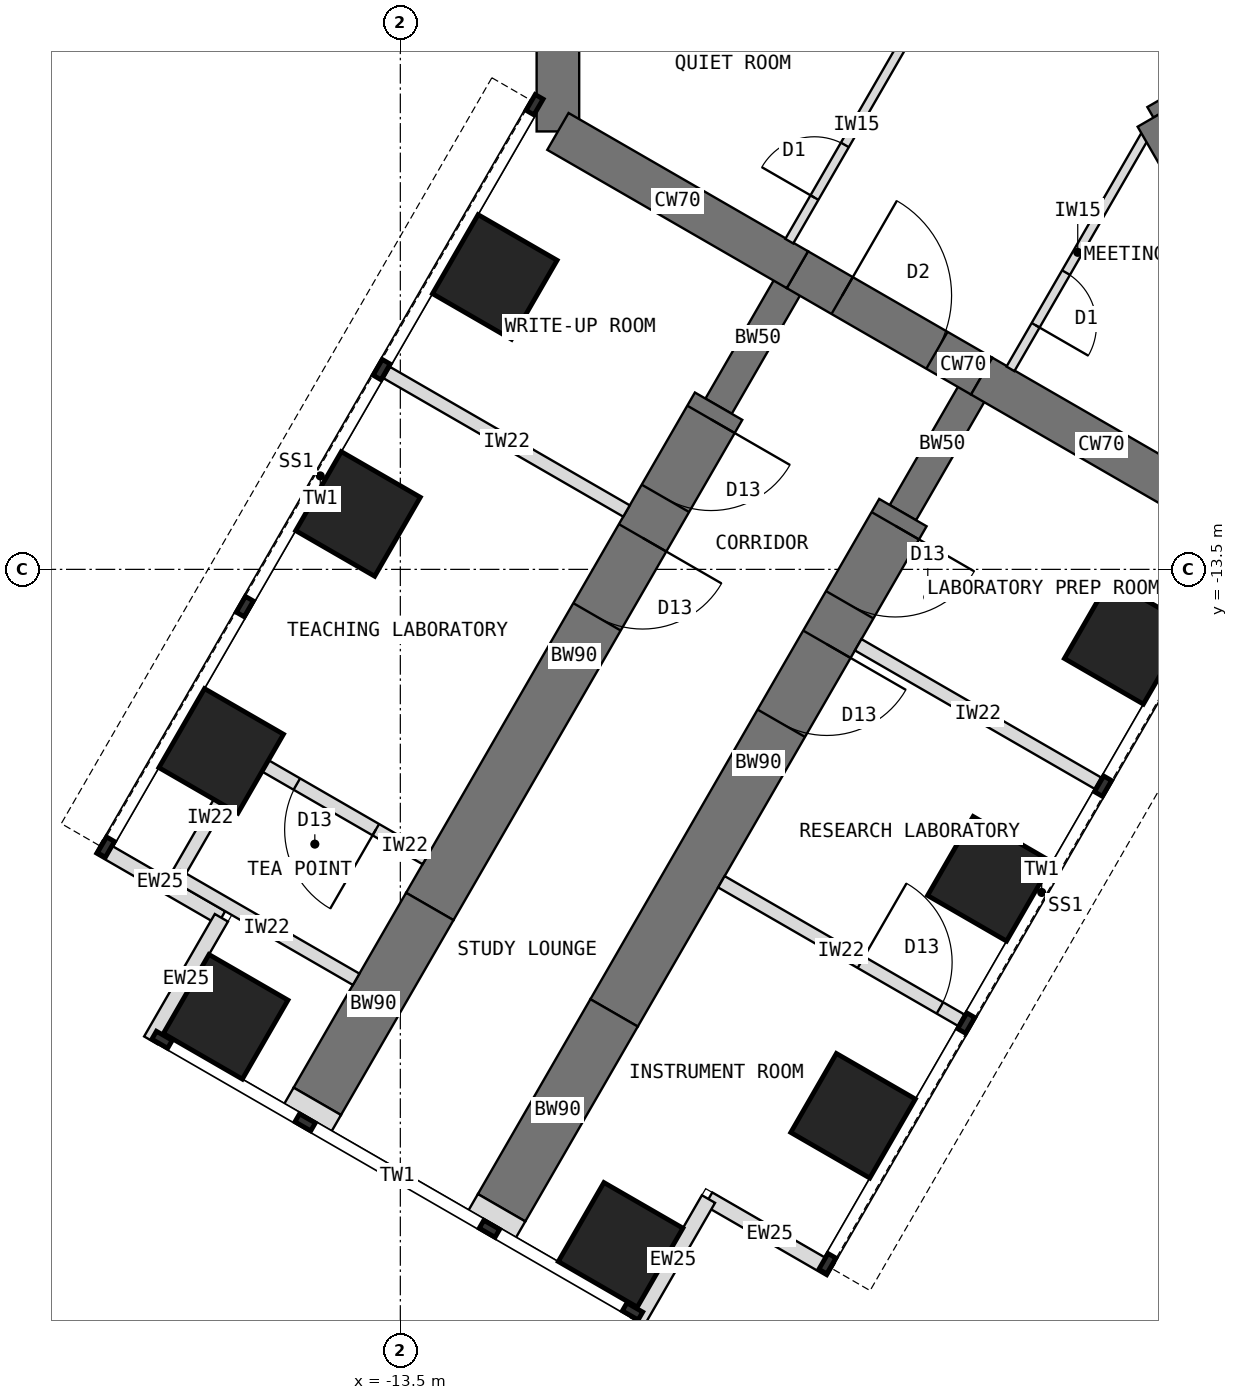
"""IFC4 building model, lengths in metres.
Left out: names, types, materials, properties, quantities, classifications, styles, units other than length and angle.
Written with IfcOpenShell. Run it as: python <this file> out.ifc"""

import sys

from ifc_helpers import new_model, si_unit, direction, frame, frame_2d, origin, origin_2d, place, context, subcontext, project, spatial, rectangle, extrude, element, fill, save


model = new_model("IFC4")
c1 = context("Model", 3, precision=1e-05, world=origin(), true_north=direction((0.0, 1.0)))
c2 = subcontext(c1, "Body", "Model", "MODEL_VIEW")
j1 = project(units=[si_unit("LENGTHUNIT", "METRE"), si_unit("PLANEANGLEUNIT", "RADIAN")], contexts=[c1])
p1 = place(None, origin())
s1 = spatial("IfcSite", under=j1, at=p1, CompositionType="ELEMENT")
p2 = place(p1, origin())
s2 = spatial("IfcBuilding", under=s1, at=p2, CompositionType="ELEMENT")
p3 = place(p2, frame((0.0, 0.0, 36.5)))
s3 = spatial("IfcBuildingStorey", under=s2, at=p3, CompositionType="ELEMENT", Elevation=36.5)
p4 = place(p3, frame((-10.908, 6.298, 0.0), z_axis=(0.0, 0.0, 1.0), x_axis=(0.0, -1.0, 0.0)))
e1 = element("IfcWall", 1, at=p4, inside=s3, PredefinedType="SHEAR", context=c2, shape_type="SweptSolid", body=[
    extrude(rectangle(XDim=12.596, YDim=0.7, at=frame_2d((6.298, 0.0))), origin(), (0.0, 0.0, 1.0), 4.0),
])
p5 = place(p3, frame((-10.908, -6.298, 0.0), z_axis=(0.0, 0.0, 1.0), x_axis=(0.866034513004, -0.499984222037, 0.0)))
e2 = element("IfcWall", 2, at=p5, inside=s3, PredefinedType="SHEAR", context=c2, shape_type="SweptSolid", body=[
    extrude(rectangle(XDim=4.548, YDim=0.7, at=frame_2d((2.274, 0.0))), origin(), (0.0, 0.0, 1.0), 4.0),
])
p6 = place(p3, frame((-6.97, -8.572, 0.0), z_axis=(0.0, 0.0, 1.0), x_axis=(0.866019471182, -0.500010275428, 0.0)))
e3 = element("IfcWall", 3, at=p6, inside=s3, PredefinedType="SHEAR", context=c2, shape_type="SweptSolid", body=[
    extrude(rectangle(XDim=3.5, YDim=0.7, at=frame_2d((1.75, 0.0))), origin(), (0.0, 0.0, 1.0), 4.0),
])
p7 = place(p6, frame((0.85, 0.0, 0.0)))
e4 = element("IfcOpeningElement", 4, at=p7, cuts=e3, PredefinedType="OPENING", context=c2, shape_type="SweptSolid", body=[
    extrude(rectangle(XDim=1.8, YDim=2.1, at=frame_2d((0.9, 1.05))), frame((0.0, 0.36, 0.0), z_axis=(0.0, -1.0, 0.0), x_axis=(1.0, 0.0, 0.0)), (0.0, 0.0, 1.0), 0.72),
])
p8 = place(p3, frame((-3.939, -10.322, 0.0), z_axis=(0.0, 0.0, 1.0), x_axis=(0.866011268655, -0.500024481964, 0.0)))
e5 = element("IfcWall", 5, at=p8, inside=s3, PredefinedType="SHEAR", context=c2, shape_type="SweptSolid", body=[
    extrude(rectangle(XDim=4.548, YDim=0.7, at=frame_2d((2.274, 0.0))), origin(), (0.0, 0.0, 1.0), 4.0),
])
p9 = place(p3, frame((-3.939, -10.322, 0.0), z_axis=(0.0, 0.0, 1.0), x_axis=(-0.499918158782, -0.866072649678, 0.0)))
e6 = element("IfcWall", 6, at=p9, inside=s3, PredefinedType="SHEAR", context=c2, shape_type="SweptSolid", body=[
    extrude(rectangle(XDim=2.592, YDim=0.5, at=frame_2d((1.296, 0.0))), origin(), (0.0, 0.0, 1.0), 4.0),
])
p10 = place(p3, frame((-5.234, -12.566, 0.0), z_axis=(0.0, 0.0, 1.0), x_axis=(-0.499997557548, -0.86602681393, 0.0)))
e7 = element("IfcWall", 7, at=p10, inside=s3, PredefinedType="SHEAR", context=c2, shape_type="SweptSolid", body=[
    extrude(rectangle(XDim=9.5, YDim=0.9, at=frame_2d((4.75, 0.0))), origin(), (0.0, 0.0, 1.0), 4.0),
])
p11 = place(p10, frame((0.25, 0.0, 0.0)))
e8 = element("IfcOpeningElement", 8, at=p11, cuts=e7, PredefinedType="OPENING", context=c2, shape_type="SweptSolid", body=[
    extrude(rectangle(XDim=1.5, YDim=2.1, at=frame_2d((0.75, 1.05))), frame((0.0, 0.46, 0.0), z_axis=(0.0, -1.0, 0.0), x_axis=(1.0, 0.0, 0.0)), (0.0, 0.0, 1.0), 0.92),
])
p12 = place(p10, frame((2.5, 0.0, 0.0)))
e9 = element("IfcOpeningElement", 9, at=p12, cuts=e7, PredefinedType="OPENING", context=c2, shape_type="SweptSolid", body=[
    extrude(rectangle(XDim=1.5, YDim=2.1, at=frame_2d((0.75, 1.05))), frame((0.0, 0.46, 0.0), z_axis=(0.0, -1.0, 0.0), x_axis=(1.0, 0.0, 0.0)), (0.0, 0.0, 1.0), 0.92),
])
p13 = place(p3, frame((-9.984, -20.794, 0.0), z_axis=(0.0, 0.0, 1.0), x_axis=(-0.500042316284, -0.866000971088, 0.0)))
e10 = element("IfcWall", 10, at=p13, inside=s3, PredefinedType="SHEAR", context=c2, shape_type="SweptSolid", body=[
    extrude(rectangle(XDim=3.7, YDim=0.9, at=frame_2d((1.85, 0.0))), origin(), (0.0, 0.0, 1.0), 4.0),
])
p14 = place(p3, frame((-6.97, -8.572, 0.0), z_axis=(0.0, 0.0, 1.0), x_axis=(-0.499988811324, -0.866031863473, 0.0)))
e11 = element("IfcWall", 11, at=p14, inside=s3, PredefinedType="SHEAR", context=c2, shape_type="SweptSolid", body=[
    extrude(rectangle(XDim=2.592, YDim=0.5, at=frame_2d((1.296, 0.0))), origin(), (0.0, 0.0, 1.0), 4.0),
])
p15 = place(p3, frame((-8.266, -10.816, 0.0), z_axis=(0.0, 0.0, 1.0), x_axis=(-0.499997557548, -0.86602681393, 0.0)))
e12 = element("IfcWall", 12, at=p15, inside=s3, PredefinedType="SHEAR", context=c2, shape_type="SweptSolid", body=[
    extrude(rectangle(XDim=9.5, YDim=0.9, at=frame_2d((4.75, 0.0))), origin(), (0.0, 0.0, 1.0), 4.0),
])
p16 = place(p15, frame((0.25, 0.0, 0.0)))
e13 = element("IfcOpeningElement", 13, at=p16, cuts=e12, PredefinedType="OPENING", context=c2, shape_type="SweptSolid", body=[
    extrude(rectangle(XDim=1.5, YDim=2.1, at=frame_2d((0.75, 1.05))), frame((0.0, 0.46, 0.0), z_axis=(0.0, -1.0, 0.0), x_axis=(1.0, 0.0, 0.0)), (0.0, 0.0, 1.0), 0.92),
])
p17 = place(p15, frame((2.5, 0.0, 0.0)))
e14 = element("IfcOpeningElement", 14, at=p17, cuts=e12, PredefinedType="OPENING", context=c2, shape_type="SweptSolid", body=[
    extrude(rectangle(XDim=1.5, YDim=2.1, at=frame_2d((0.75, 1.05))), frame((0.0, 0.46, 0.0), z_axis=(0.0, -1.0, 0.0), x_axis=(1.0, 0.0, 0.0)), (0.0, 0.0, 1.0), 0.92),
])
p18 = place(p3, frame((-13.016, -19.044, 0.0), z_axis=(0.0, 0.0, 1.0), x_axis=(-0.499992827086, -0.866029545028, 0.0)))
e15 = element("IfcWall", 15, at=p18, inside=s3, PredefinedType="SHEAR", context=c2, shape_type="SweptSolid", body=[
    extrude(rectangle(XDim=3.7, YDim=0.9, at=frame_2d((1.85, 0.0))), origin(), (0.0, 0.0, 1.0), 4.0),
])
for number, where, z_axis, x_axis in (
    (16, (-1.554, -14.691, 0.0), (0.0, 0.0, 1.0), (0.5, 0.866, 0.0)),
    (17, (-11.946, -8.691, 0.0), (0.0, 0.0, 1.0), (0.5, 0.866, 0.0)),
    (18, (-3.804, -18.588, 0.0), (0.0, 0.0, 1.0), (0.5, 0.866, 0.0)),
    (19, (-14.196, -12.588, 0.0), (0.0, 0.0, 1.0), (0.5, 0.866, 0.0)),
    (20, (-6.054, -22.486, 0.0), (0.0, 0.0, 1.0), (0.5, 0.866, 0.0)),
    (21, (-16.446, -16.486, 0.0), (0.0, 0.0, 1.0), (0.5, 0.866, 0.0)),
    (22, (-9.877, -24.608, 0.0), (0.0, 0.0, 1.0), (0.5, 0.866, 0.0)),
    (23, (-16.373, -20.858, 0.0), (0.0, 0.0, 1.0), (0.5, 0.866, 0.0)),
):
    element("IfcColumn", number, at=place(p3, frame(where, z_axis=z_axis, x_axis=x_axis)), inside=s3, PredefinedType="COLUMN", context=c2, shape_type="SweptSolid", body=[
        extrude(rectangle(XDim=1.5, YDim=1.5, at=origin_2d()), origin(), (0.0, 0.0, 1.0), 4.0),
    ])
for number, where, z_axis, x_axis in (
    (24, (-6.419, -25.017, 0.0), (0.0, 0.0, 1.0), (-0.866, 0.5, 0.0)),
    (25, (-8.432, -23.855, 0.0), (0.0, 0.0, 1.0), (-0.5, -0.866, 0.0)),
    (26, (-18.456, -18.067, 0.0), (0.0, 0.0, 1.0), (0.866, -0.5, 0.0)),
    (27, (-16.443, -19.23, 0.0), (0.0, 0.0, 1.0), (-0.5, -0.866, 0.0)),
):
    element("IfcWall", number, at=place(p3, frame(where, z_axis=z_axis, x_axis=x_axis)), inside=s3, PredefinedType="STANDARD", context=c2, shape_type="SweptSolid", body=[
        extrude(rectangle(XDim=2.325, YDim=0.25, at=frame_2d((1.163, 0.0))), origin(), (0.0, 0.0, 1.0), 3.8),
    ])
for number, where, z_axis, x_axis in (
    (28, (-11.834, -23.998, 0.0), (0.0, 0.0, 1.0), (-0.5, -0.866, 0.0)),
    (29, (-14.865, -22.248, 0.0), (0.0, 0.0, 1.0), (-0.5, -0.866, 0.0)),
):
    element("IfcWall", number, at=place(p3, frame(where, z_axis=z_axis, x_axis=x_axis)), inside=s3, PredefinedType="PARTITIONING", context=c2, shape_type="SweptSolid", body=[
        extrude(rectangle(XDim=0.31, YDim=0.9, at=frame_2d((0.155, 0.0))), origin(), (0.0, 0.0, 1.0), 3.8),
    ])
p19 = place(p3, frame((-1.164, -5.984, 0.0), z_axis=(0.0, 0.0, 1.0), x_axis=(0.866026010844, 0.49999894854, 0.0)))
e30 = element("IfcWall", 30, at=p19, inside=s3, PredefinedType="SHEAR", context=c2, shape_type="SweptSolid", body=[
    extrude(rectangle(XDim=8.0, YDim=0.2, at=frame_2d((4.0, 0.0))), origin(), (0.0, 0.0, 1.0), 4.0),
])
p20 = place(p19, frame((6.3, 0.0, 0.0)))
e31 = element("IfcOpeningElement", 31, at=p20, cuts=e30, PredefinedType="OPENING", context=c2, shape_type="SweptSolid", body=[
    extrude(rectangle(XDim=1.2, YDim=2.1, at=frame_2d((0.6, 1.05))), frame((0.0, 0.11, 0.0), z_axis=(0.0, -1.0, 0.0), x_axis=(1.0, 0.0, 0.0)), (0.0, 0.0, 1.0), 0.22),
])
p21 = place(p19, frame((0.9, 0.0, 0.0)))
e32 = element("IfcOpeningElement", 32, at=p21, cuts=e30, PredefinedType="OPENING", context=c2, shape_type="SweptSolid", body=[
    extrude(rectangle(XDim=1.1, YDim=2.2, at=frame_2d((0.55, 1.1))), frame((0.0, 0.11, 0.0), z_axis=(0.0, -1.0, 0.0), x_axis=(1.0, 0.0, 0.0)), (0.0, 0.0, 1.0), 0.22),
])
p22 = place(p19, frame((3.8, 0.0, 0.0)))
e33 = element("IfcOpeningElement", 33, at=p22, cuts=e30, PredefinedType="OPENING", context=c2, shape_type="SweptSolid", body=[
    extrude(rectangle(XDim=1.1, YDim=2.2, at=frame_2d((0.55, 1.1))), frame((0.0, 0.11, 0.0), z_axis=(0.0, -1.0, 0.0), x_axis=(1.0, 0.0, 0.0)), (0.0, 0.0, 1.0), 0.22),
])
p23 = place(p3, frame((-1.201, -6.12, 0.0), z_axis=(0.0, 0.0, 1.0), x_axis=(0.500002627198, -0.866023886965, 0.0)))
e34 = element("IfcWall", 34, at=p23, inside=s3, PredefinedType="SHEAR", context=c2, shape_type="SweptSolid", body=[
    extrude(rectangle(XDim=5.858, YDim=0.4, at=frame_2d((2.929, 0.0))), origin(), (0.0, 0.0, 1.0), 4.0),
])
p24 = place(p3, frame((-5.97, -14.74, 0.0), z_axis=(0.0, 0.0, 1.0), x_axis=(0.866035472144, -0.499982560684, 0.0)))
e35 = element("IfcWall", 35, at=p24, inside=s3, PredefinedType="PARTITIONING", context=c2, shape_type="SweptSolid", body=[
    extrude(rectangle(XDim=4.55, YDim=0.215, at=frame_2d((2.275, 0.0))), origin(), (0.0, 0.0, 1.0), 3.8),
])
p25 = place(p3, frame((-8.22, -18.637, 0.0), z_axis=(0.0, 0.0, 1.0), x_axis=(0.866012237902, -0.500022803284, 0.0)))
e36 = element("IfcWall", 36, at=p25, inside=s3, PredefinedType="PARTITIONING", context=c2, shape_type="SweptSolid", body=[
    extrude(rectangle(XDim=4.55, YDim=0.215, at=frame_2d((2.275, 0.0))), origin(), (0.0, 0.0, 1.0), 3.8),
])
p26 = place(p25, frame((2.65, 0.0, 0.0)))
e37 = element("IfcOpeningElement", 37, at=p26, cuts=e36, PredefinedType="OPENING", context=c2, shape_type="SweptSolid", body=[
    extrude(rectangle(XDim=1.5, YDim=2.1, at=frame_2d((0.75, 1.05))), frame((0.0, 0.117, 0.0), z_axis=(0.0, -1.0, 0.0), x_axis=(1.0, 0.0, 0.0)), (0.0, 0.0, 1.0), 0.235),
])
p27 = place(p3, frame((-9.78, -12.54, 0.0), z_axis=(0.0, 0.0, 1.0), x_axis=(-0.866035472144, 0.499982560684, 0.0)))
e38 = element("IfcWall", 38, at=p27, inside=s3, PredefinedType="PARTITIONING", context=c2, shape_type="SweptSolid", body=[
    extrude(rectangle(XDim=4.55, YDim=0.215, at=frame_2d((2.275, 0.0))), origin(), (0.0, 0.0, 1.0), 3.8),
])
p28 = place(p3, frame((-16.025, -16.556, 0.0), z_axis=(0.0, 0.0, 1.0), x_axis=(-0.500077600433, -0.865980596518, 0.0)))
e39 = element("IfcWall", 39, at=p28, inside=s3, PredefinedType="PARTITIONING", context=c2, shape_type="SweptSolid", body=[
    extrude(rectangle(XDim=2.4, YDim=0.215, at=frame_2d((1.2, 0.0))), origin(), (0.0, 0.0, 1.0), 3.8),
])
p29 = place(p3, frame((-13.08, -18.256, 0.0), z_axis=(0.0, 0.0, 1.0), x_axis=(-0.866020560687, 0.500008388397, 0.0)))
e40 = element("IfcWall", 40, at=p29, inside=s3, PredefinedType="PARTITIONING", context=c2, shape_type="SweptSolid", body=[
    extrude(rectangle(XDim=3.4, YDim=0.215, at=frame_2d((1.7, 0.0))), origin(), (0.0, 0.0, 1.0), 3.8),
])
p30 = place(p29, frame((0.95, 0.0, 0.0)))
e41 = element("IfcOpeningElement", 41, at=p30, cuts=e40, PredefinedType="OPENING", context=c2, shape_type="SweptSolid", body=[
    extrude(rectangle(XDim=1.5, YDim=2.1, at=frame_2d((0.75, 1.05))), frame((0.0, 0.117, 0.0), z_axis=(0.0, -1.0, 0.0), x_axis=(1.0, 0.0, 0.0)), (0.0, 0.0, 1.0), 0.235),
])
p31 = place(p3, frame((-14.227, -20.241, 0.0), z_axis=(0.0, 0.0, 1.0), x_axis=(-0.866020560687, 0.500008388397, 0.0)))
e42 = element("IfcWall", 42, at=p31, inside=s3, PredefinedType="PARTITIONING", context=c2, shape_type="SweptSolid", body=[
    extrude(rectangle(XDim=3.4, YDim=0.215, at=frame_2d((1.7, 0.0))), origin(), (0.0, 0.0, 1.0), 3.8),
])
p32 = place(p3, frame((-1.253, -6.37, 0.0), z_axis=(0.0, 0.0, 1.0), x_axis=(-0.500007369519, -0.866021148949, 0.0)))
e43 = element("IfcWall", 43, at=p32, inside=s3, PredefinedType="PARTITIONING", context=c2, shape_type="SweptSolid", body=[
    extrude(rectangle(XDim=4.426, YDim=0.15, at=frame_2d((2.213, 0.0))), origin(), (0.0, 0.0, 1.0), 3.8),
])
p33 = place(p32, frame((2.598, 0.0, 0.0)))
e44 = element("IfcOpeningElement", 44, at=p33, cuts=e43, PredefinedType="OPENING", context=c2, shape_type="SweptSolid", body=[
    extrude(rectangle(XDim=1.0, YDim=2.1, at=frame_2d((0.5, 1.05))), frame((0.0, 0.085, 0.0), z_axis=(0.0, -1.0, 0.0), x_axis=(1.0, 0.0, 0.0)), (0.0, 0.0, 1.0), 0.17),
])
p34 = place(p3, frame((-7.103, -8.103, 0.0), z_axis=(0.0, 0.0, 1.0), x_axis=(0.500007369519, 0.866021148949, 0.0)))
e45 = element("IfcWall", 45, at=p34, inside=s3, PredefinedType="PARTITIONING", context=c2, shape_type="SweptSolid", body=[
    extrude(rectangle(XDim=4.426, YDim=0.15, at=frame_2d((2.213, 0.0))), origin(), (0.0, 0.0, 1.0), 3.8),
])
p35 = place(p34, frame((0.828, 0.0, 0.0)))
e46 = element("IfcOpeningElement", 46, at=p35, cuts=e45, PredefinedType="OPENING", context=c2, shape_type="SweptSolid", body=[
    extrude(rectangle(XDim=1.0, YDim=2.1, at=frame_2d((0.5, 1.05))), frame((0.0, 0.085, 0.0), z_axis=(0.0, -1.0, 0.0), x_axis=(1.0, 0.0, 0.0)), (0.0, 0.0, 1.0), 0.17),
])
p36 = place(p7, origin())
e47 = element("IfcDoor", 47, at=p36, inside=s3, OperationType="DOUBLE_DOOR_DOUBLE_SWING", PredefinedType="DOOR", context=c2, shape_type="SweptSolid", body=[
    extrude(rectangle(XDim=1.72, YDim=2.06, at=frame_2d((0.9, 1.03))), frame((0.0, 0.025, 0.0), z_axis=(0.0, -1.0, 0.0), x_axis=(1.0, 0.0, 0.0)), (0.0, 0.0, 1.0), 0.05),
    extrude(rectangle(XDim=0.04, YDim=2.1, at=frame_2d((0.02, 1.05))), frame((0.0, 0.35, 0.0), z_axis=(0.0, -1.0, 0.0), x_axis=(1.0, 0.0, 0.0)), (0.0, 0.0, 1.0), 0.699),
    extrude(rectangle(XDim=0.04, YDim=2.1, at=frame_2d((1.78, 1.05))), frame((0.0, 0.35, 0.0), z_axis=(0.0, -1.0, 0.0), x_axis=(1.0, 0.0, 0.0)), (0.0, 0.0, 1.0), 0.699),
    extrude(rectangle(XDim=1.72, YDim=0.04, at=frame_2d((0.9, 2.08))), frame((0.0, 0.35, 0.0), z_axis=(0.0, -1.0, 0.0), x_axis=(1.0, 0.0, 0.0)), (0.0, 0.0, 1.0), 0.699),
])
fill(e4, e47)
p37 = place(p26, origin())
e48 = element("IfcDoor", 48, at=p37, inside=s3, OperationType="DOUBLE_DOOR_SINGLE_SWING", PredefinedType="DOOR", context=c2, shape_type="SweptSolid", body=[
    extrude(rectangle(XDim=1.5, YDim=2.1, at=frame_2d((0.75, 1.05))), frame((0.0, 0.025, 0.0), z_axis=(0.0, -1.0, 0.0), x_axis=(1.0, 0.0, 0.0)), (0.0, 0.0, 1.0), 0.05),
])
fill(e37, e48)
p38 = place(p30, origin())
e49 = element("IfcDoor", 49, at=p38, inside=s3, OperationType="DOUBLE_DOOR_SINGLE_SWING", PredefinedType="DOOR", context=c2, shape_type="SweptSolid", body=[
    extrude(rectangle(XDim=1.5, YDim=2.1, at=frame_2d((0.75, 1.05))), frame((0.0, 0.025, 0.0), z_axis=(0.0, -1.0, 0.0), x_axis=(1.0, 0.0, 0.0)), (0.0, 0.0, 1.0), 0.05),
])
fill(e41, e49)
p39 = place(p35, origin())
e50 = element("IfcDoor", 50, at=p39, inside=s3, OperationType="SINGLE_SWING_LEFT", PredefinedType="DOOR", context=c2, shape_type="SweptSolid", body=[
    extrude(rectangle(XDim=1.0, YDim=2.1, at=frame_2d((0.5, 1.05))), frame((0.0, 0.025, 0.0), z_axis=(0.0, -1.0, 0.0), x_axis=(1.0, 0.0, 0.0)), (0.0, 0.0, 1.0), 0.05),
])
fill(e46, e50)
p40 = place(p33, origin())
e51 = element("IfcDoor", 51, at=p40, inside=s3, OperationType="SINGLE_SWING_RIGHT", PredefinedType="DOOR", context=c2, shape_type="SweptSolid", body=[
    extrude(rectangle(XDim=1.0, YDim=2.1, at=frame_2d((0.5, 1.05))), frame((0.0, 0.025, 0.0), z_axis=(0.0, -1.0, 0.0), x_axis=(1.0, 0.0, 0.0)), (0.0, 0.0, 1.0), 0.05),
])
fill(e44, e51)
p41 = place(p11, origin())
e52 = element("IfcDoor", 52, at=p41, inside=s3, OperationType="DOUBLE_DOOR_SINGLE_SWING", PredefinedType="DOOR", context=c2, shape_type="SweptSolid", body=[
    extrude(rectangle(XDim=1.42, YDim=2.06, at=frame_2d((0.75, 1.03))), frame((0.0, 0.025, 0.0), z_axis=(0.0, -1.0, 0.0), x_axis=(1.0, 0.0, 0.0)), (0.0, 0.0, 1.0), 0.05),
    extrude(rectangle(XDim=0.04, YDim=2.1, at=frame_2d((0.02, 1.05))), frame((0.0, 0.45, 0.0), z_axis=(0.0, -1.0, 0.0), x_axis=(1.0, 0.0, 0.0)), (0.0, 0.0, 1.0), 0.899),
    extrude(rectangle(XDim=0.04, YDim=2.1, at=frame_2d((1.48, 1.05))), frame((0.0, 0.45, 0.0), z_axis=(0.0, -1.0, 0.0), x_axis=(1.0, 0.0, 0.0)), (0.0, 0.0, 1.0), 0.899),
    extrude(rectangle(XDim=1.42, YDim=0.04, at=frame_2d((0.75, 2.08))), frame((0.0, 0.45, 0.0), z_axis=(0.0, -1.0, 0.0), x_axis=(1.0, 0.0, 0.0)), (0.0, 0.0, 1.0), 0.899),
])
fill(e8, e52)
p42 = place(p12, origin())
e53 = element("IfcDoor", 53, at=p42, inside=s3, OperationType="DOUBLE_DOOR_SINGLE_SWING", PredefinedType="DOOR", context=c2, shape_type="SweptSolid", body=[
    extrude(rectangle(XDim=1.42, YDim=2.06, at=frame_2d((0.75, 1.03))), frame((0.0, 0.025, 0.0), z_axis=(0.0, -1.0, 0.0), x_axis=(1.0, 0.0, 0.0)), (0.0, 0.0, 1.0), 0.05),
    extrude(rectangle(XDim=0.04, YDim=2.1, at=frame_2d((0.02, 1.05))), frame((0.0, 0.45, 0.0), z_axis=(0.0, -1.0, 0.0), x_axis=(1.0, 0.0, 0.0)), (0.0, 0.0, 1.0), 0.899),
    extrude(rectangle(XDim=0.04, YDim=2.1, at=frame_2d((1.48, 1.05))), frame((0.0, 0.45, 0.0), z_axis=(0.0, -1.0, 0.0), x_axis=(1.0, 0.0, 0.0)), (0.0, 0.0, 1.0), 0.899),
    extrude(rectangle(XDim=1.42, YDim=0.04, at=frame_2d((0.75, 2.08))), frame((0.0, 0.45, 0.0), z_axis=(0.0, -1.0, 0.0), x_axis=(1.0, 0.0, 0.0)), (0.0, 0.0, 1.0), 0.899),
])
fill(e9, e53)
p43 = place(p16, origin())
e54 = element("IfcDoor", 54, at=p43, inside=s3, OperationType="DOUBLE_DOOR_SINGLE_SWING", PredefinedType="DOOR", context=c2, shape_type="SweptSolid", body=[
    extrude(rectangle(XDim=1.42, YDim=2.06, at=frame_2d((0.75, 1.03))), frame((0.0, 0.025, 0.0), z_axis=(0.0, -1.0, 0.0), x_axis=(1.0, 0.0, 0.0)), (0.0, 0.0, 1.0), 0.05),
    extrude(rectangle(XDim=0.04, YDim=2.1, at=frame_2d((0.02, 1.05))), frame((0.0, 0.45, 0.0), z_axis=(0.0, -1.0, 0.0), x_axis=(1.0, 0.0, 0.0)), (0.0, 0.0, 1.0), 0.899),
    extrude(rectangle(XDim=0.04, YDim=2.1, at=frame_2d((1.48, 1.05))), frame((0.0, 0.45, 0.0), z_axis=(0.0, -1.0, 0.0), x_axis=(1.0, 0.0, 0.0)), (0.0, 0.0, 1.0), 0.899),
    extrude(rectangle(XDim=1.42, YDim=0.04, at=frame_2d((0.75, 2.08))), frame((0.0, 0.45, 0.0), z_axis=(0.0, -1.0, 0.0), x_axis=(1.0, 0.0, 0.0)), (0.0, 0.0, 1.0), 0.899),
])
fill(e13, e54)
p44 = place(p17, origin())
e55 = element("IfcDoor", 55, at=p44, inside=s3, OperationType="DOUBLE_DOOR_SINGLE_SWING", PredefinedType="DOOR", context=c2, shape_type="SweptSolid", body=[
    extrude(rectangle(XDim=1.42, YDim=2.06, at=frame_2d((0.75, 1.03))), frame((0.0, 0.025, 0.0), z_axis=(0.0, -1.0, 0.0), x_axis=(1.0, 0.0, 0.0)), (0.0, 0.0, 1.0), 0.05),
    extrude(rectangle(XDim=0.04, YDim=2.1, at=frame_2d((0.02, 1.05))), frame((0.0, 0.45, 0.0), z_axis=(0.0, -1.0, 0.0), x_axis=(1.0, 0.0, 0.0)), (0.0, 0.0, 1.0), 0.899),
    extrude(rectangle(XDim=0.04, YDim=2.1, at=frame_2d((1.48, 1.05))), frame((0.0, 0.45, 0.0), z_axis=(0.0, -1.0, 0.0), x_axis=(1.0, 0.0, 0.0)), (0.0, 0.0, 1.0), 0.899),
    extrude(rectangle(XDim=1.42, YDim=0.04, at=frame_2d((0.75, 2.08))), frame((0.0, 0.45, 0.0), z_axis=(0.0, -1.0, 0.0), x_axis=(1.0, 0.0, 0.0)), (0.0, 0.0, 1.0), 0.899),
])
fill(e14, e55)
save(model, sys.argv[1])
